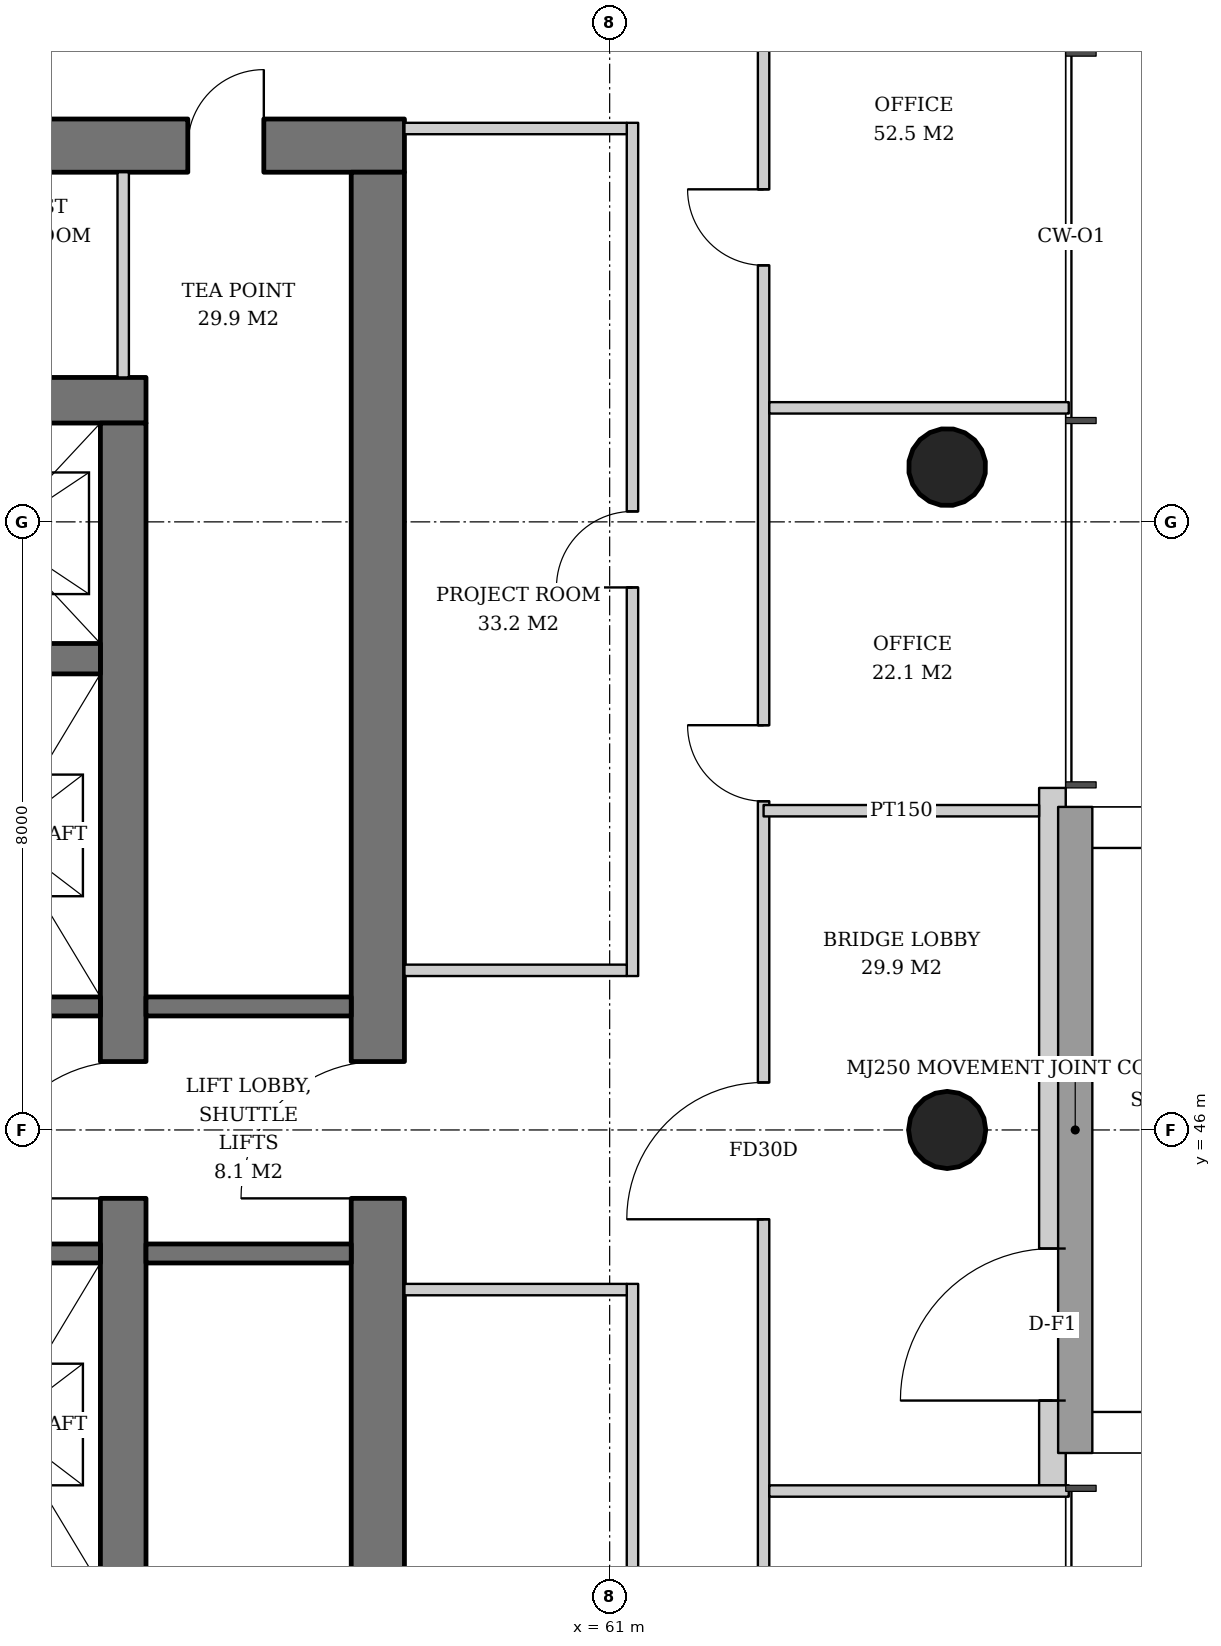
"""IFC4 building model, lengths in metres.
Left out: names, types, materials, properties, quantities, classifications, styles, units other than length and angle.
Written with IfcOpenShell. Run it as: python <this file> out.ifc"""

import sys

from ifc_helpers import new_model, si_unit, direction, frame, frame_2d, origin, origin_2d, place, context, subcontext, project, spatial, rectangle, hollow_circle, extrude, element, fill, save


model = new_model("IFC4")
c1 = context("Model", 3, precision=1e-05, world=origin(), true_north=direction((0.0, 1.0)))
c2 = subcontext(c1, "Body", "Model", "MODEL_VIEW")
j1 = project(units=[si_unit("LENGTHUNIT", "METRE"), si_unit("PLANEANGLEUNIT", "RADIAN")], contexts=[c1])
p1 = place(None, origin())
s1 = spatial("IfcSite", under=j1, at=p1, CompositionType="ELEMENT")
p2 = place(p1, origin())
s2 = spatial("IfcBuilding", under=s1, at=p2, CompositionType="ELEMENT")
p3 = place(p2, frame((0.0, 0.0, 131.2)))
s3 = spatial("IfcBuildingStorey", under=s2, at=p3, CompositionType="ELEMENT", Elevation=131.2)
p4 = place(p3, frame((65.479, 46.0, 0.0), z_axis=(-0.031914348339, 0.0, 0.999490607445), x_axis=(0.0, -1.0, 0.0)))
e1 = element("IfcColumn", 1, at=p4, inside=s3, PredefinedType="COLUMN", context=c2, shape_type="SweptSolid", body=[
    extrude(hollow_circle(Radius=0.508, WallThickness=0.04, at=origin_2d()), origin(), (0.0, 0.0, 1.0), 3.802),
])
p5 = place(p3, frame((65.479, 54.739, 0.0), z_axis=(-0.031910269556, -0.015987237665, 0.999362868496), x_axis=(0.447933021895, -0.894067115991, 0.0)))
e2 = element("IfcColumn", 2, at=p5, inside=s3, PredefinedType="COLUMN", context=c2, shape_type="SweptSolid", body=[
    extrude(hollow_circle(Radius=0.508, WallThickness=0.04, at=origin_2d()), origin(), (0.0, 0.0, 1.0), 3.802),
])
p6 = place(p3, frame((35.1, 55.6, 0.0), z_axis=(0.0, 0.0, 1.0), x_axis=(1.0, 0.0, 0.0)))
e3 = element("IfcWall", 3, at=p6, inside=s3, PredefinedType="SHEAR", context=c2, shape_type="SweptSolid", body=[
    extrude(rectangle(XDim=19.8, YDim=0.6, at=frame_2d((9.9, 0.0))), origin(), (0.0, 0.0, 1.0), 3.8),
])
p7 = place(p6, frame((14.54, 0.0, 0.0)))
e4 = element("IfcOpeningElement", 4, at=p7, cuts=e3, PredefinedType="OPENING", context=c2, shape_type="SweptSolid", body=[
    extrude(rectangle(XDim=1.0, YDim=2.1, at=frame_2d((0.5, 1.05))), frame((0.0, 0.31, 0.0), z_axis=(0.0, -1.0, 0.0), x_axis=(1.0, 0.0, 0.0)), (0.0, 0.0, 1.0), 0.62),
])
p8 = place(p6, frame((2.425, 0.0, 0.0)))
e5 = element("IfcOpeningElement", 5, at=p8, cuts=e3, PredefinedType="OPENING", context=c2, shape_type="SweptSolid", body=[
    extrude(rectangle(XDim=1.0, YDim=2.1, at=frame_2d((0.5, 1.05))), frame((0.0, 0.31, 0.0), z_axis=(0.0, -1.0, 0.0), x_axis=(1.0, 0.0, 0.0)), (0.0, 0.0, 1.0), 0.62),
])
p9 = place(p3, frame((54.6, 36.7, 0.0), z_axis=(0.0, 0.0, 1.0), x_axis=(0.0, 1.0, 0.0)))
e6 = element("IfcWall", 6, at=p9, inside=s3, PredefinedType="SHEAR", context=c2, shape_type="SweptSolid", body=[
    extrude(rectangle(XDim=18.6, YDim=0.6, at=frame_2d((9.3, 0.0))), origin(), (0.0, 0.0, 1.0), 3.8),
])
p10 = place(p9, frame((8.4, 0.0, 0.0)))
e7 = element("IfcOpeningElement", 7, at=p10, cuts=e6, PredefinedType="OPENING", context=c2, shape_type="SweptSolid", body=[
    extrude(rectangle(XDim=1.8, YDim=2.4, at=frame_2d((0.9, 1.2))), frame((0.0, 0.31, 0.0), z_axis=(0.0, -1.0, 0.0), x_axis=(1.0, 0.0, 0.0)), (0.0, 0.0, 1.0), 0.62),
])
p11 = place(p3, frame((31.7, 58.95, 0.0), z_axis=(0.0, 0.0, 1.0), x_axis=(1.0, 0.0, 0.0)))
e8 = element("IfcWall", 8, at=p11, inside=s3, PredefinedType="SHEAR", context=c2, shape_type="SweptSolid", body=[
    extrude(rectangle(XDim=26.6, YDim=0.7, at=frame_2d((13.3, 0.0))), origin(), (0.0, 0.0, 1.0), 3.8),
])
p12 = place(p11, frame((17.94, 0.0, 0.0)))
e9 = element("IfcOpeningElement", 9, at=p12, cuts=e8, PredefinedType="OPENING", context=c2, shape_type="SweptSolid", body=[
    extrude(rectangle(XDim=1.0, YDim=2.1, at=frame_2d((0.5, 1.05))), frame((0.0, 0.36, 0.0), z_axis=(0.0, -1.0, 0.0), x_axis=(1.0, 0.0, 0.0)), (0.0, 0.0, 1.0), 0.72),
])
p13 = place(p11, frame((5.825, 0.0, 0.0)))
e10 = element("IfcOpeningElement", 10, at=p13, cuts=e8, PredefinedType="OPENING", context=c2, shape_type="SweptSolid", body=[
    extrude(rectangle(XDim=1.0, YDim=2.1, at=frame_2d((0.5, 1.05))), frame((0.0, 0.36, 0.0), z_axis=(0.0, -1.0, 0.0), x_axis=(1.0, 0.0, 0.0)), (0.0, 0.0, 1.0), 0.72),
])
p14 = place(p11, frame((1.169, 0.0, 0.0)))
e11 = element("IfcOpeningElement", 11, at=p14, cuts=e8, PredefinedType="OPENING", context=c2, shape_type="SweptSolid", body=[
    extrude(rectangle(XDim=1.0, YDim=2.1, at=frame_2d((0.5, 1.05))), frame((0.0, 0.36, 0.0), z_axis=(0.0, -1.0, 0.0), x_axis=(1.0, 0.0, 0.0)), (0.0, 0.0, 1.0), 0.72),
])
p15 = place(p11, frame((3.447, 0.0, 0.0)))
e12 = element("IfcOpeningElement", 12, at=p15, cuts=e8, PredefinedType="OPENING", context=c2, shape_type="SweptSolid", body=[
    extrude(rectangle(XDim=1.0, YDim=2.1, at=frame_2d((0.5, 1.05))), frame((0.0, 0.36, 0.0), z_axis=(0.0, -1.0, 0.0), x_axis=(1.0, 0.0, 0.0)), (0.0, 0.0, 1.0), 0.72),
])
p16 = place(p11, frame((8.342, 0.0, 0.0)))
e13 = element("IfcOpeningElement", 13, at=p16, cuts=e8, PredefinedType="OPENING", context=c2, shape_type="SweptSolid", body=[
    extrude(rectangle(XDim=1.0, YDim=2.1, at=frame_2d((0.5, 1.05))), frame((0.0, 0.36, 0.0), z_axis=(0.0, -1.0, 0.0), x_axis=(1.0, 0.0, 0.0)), (0.0, 0.0, 1.0), 0.72),
])
p17 = place(p11, frame((11.626, 0.0, 0.0)))
e14 = element("IfcOpeningElement", 14, at=p17, cuts=e8, PredefinedType="OPENING", context=c2, shape_type="SweptSolid", body=[
    extrude(rectangle(XDim=1.0, YDim=2.1, at=frame_2d((0.5, 1.05))), frame((0.0, 0.36, 0.0), z_axis=(0.0, -1.0, 0.0), x_axis=(1.0, 0.0, 0.0)), (0.0, 0.0, 1.0), 0.72),
])
p18 = place(p11, frame((14.862, 0.0, 0.0)))
e15 = element("IfcOpeningElement", 15, at=p18, cuts=e8, PredefinedType="OPENING", context=c2, shape_type="SweptSolid", body=[
    extrude(rectangle(XDim=1.0, YDim=2.1, at=frame_2d((0.5, 1.05))), frame((0.0, 0.36, 0.0), z_axis=(0.0, -1.0, 0.0), x_axis=(1.0, 0.0, 0.0)), (0.0, 0.0, 1.0), 0.72),
])
p19 = place(p11, frame((20.9, 0.0, 0.0)))
e16 = element("IfcOpeningElement", 16, at=p19, cuts=e8, PredefinedType="OPENING", context=c2, shape_type="SweptSolid", body=[
    extrude(rectangle(XDim=1.0, YDim=2.1, at=frame_2d((0.5, 1.05))), frame((0.0, 0.36, 0.0), z_axis=(0.0, -1.0, 0.0), x_axis=(1.0, 0.0, 0.0)), (0.0, 0.0, 1.0), 0.72),
])
p20 = place(p11, frame((23.75, 0.0, 0.0)))
e17 = element("IfcOpeningElement", 17, at=p20, cuts=e8, PredefinedType="OPENING", context=c2, shape_type="SweptSolid", body=[
    extrude(rectangle(XDim=1.0, YDim=2.1, at=frame_2d((0.5, 1.05))), frame((0.0, 0.36, 0.0), z_axis=(0.0, -1.0, 0.0), x_axis=(1.0, 0.0, 0.0)), (0.0, 0.0, 1.0), 0.72),
])
p21 = place(p3, frame((57.95, 33.4, 0.0), z_axis=(0.0, 0.0, 1.0), x_axis=(0.0, 1.0, 0.0)))
e18 = element("IfcWall", 18, at=p21, inside=s3, PredefinedType="SHEAR", context=c2, shape_type="SweptSolid", body=[
    extrude(rectangle(XDim=25.2, YDim=0.7, at=frame_2d((12.6, 0.0))), origin(), (0.0, 0.0, 1.0), 3.8),
])
p22 = place(p21, frame((11.7, 0.0, 0.0)))
e19 = element("IfcOpeningElement", 19, at=p22, cuts=e18, PredefinedType="OPENING", context=c2, shape_type="SweptSolid", body=[
    extrude(rectangle(XDim=1.8, YDim=2.4, at=frame_2d((0.9, 1.2))), frame((0.0, 0.36, 0.0), z_axis=(0.0, -1.0, 0.0), x_axis=(1.0, 0.0, 0.0)), (0.0, 0.0, 1.0), 0.72),
])
p23 = place(p3, frame((35.7, 52.2, 0.0), z_axis=(0.0, 0.0, 1.0), x_axis=(1.0, 0.0, 0.0)))
e20 = element("IfcWall", 20, at=p23, inside=s3, PredefinedType="SHEAR", context=c2, shape_type="SweptSolid", body=[
    extrude(rectangle(XDim=18.6, YDim=0.4, at=frame_2d((9.3, 0.0))), origin(), (0.0, 0.0, 1.0), 3.8),
])
p24 = place(p3, frame((66.825, 41.325, 0.0), z_axis=(0.0, 0.0, 1.0), x_axis=(0.0, 1.0, 0.0)))
e21 = element("IfcWall", 21, at=p24, inside=s3, PredefinedType="SOLIDWALL", context=c2, shape_type="SweptSolid", body=[
    extrude(rectangle(XDim=9.175, YDim=0.35, at=frame_2d((4.587, 0.0))), origin(), (0.0, 0.0, 1.0), 3.62),
])
p25 = place(p24, frame((1.115, 0.0, 0.0)))
e22 = element("IfcOpeningElement", 22, at=p25, cuts=e21, PredefinedType="OPENING", context=c2, shape_type="SweptSolid", body=[
    extrude(rectangle(XDim=2.0, YDim=2.4, at=frame_2d((1.0, 1.2))), frame((0.0, 0.185, 0.0), z_axis=(0.0, -1.0, 0.0), x_axis=(1.0, 0.0, 0.0)), (0.0, 0.0, 1.0), 0.37),
])
for number, where, z_axis, x_axis in (
    (23, (48.93, 47.625, 0.0), (0.0, 0.0, 1.0), (1.0, 0.0, 0.0)),
    (24, (48.93, 44.375, 0.0), (0.0, 0.0, 1.0), (1.0, 0.0, 0.0)),
):
    element("IfcWall", number, at=place(p3, frame(where, z_axis=z_axis, x_axis=x_axis)), inside=s3, PredefinedType="SHEAR", context=c2, shape_type="SweptSolid", body=[
        extrude(rectangle(XDim=5.37, YDim=0.25, at=frame_2d((2.685, 0.0))), origin(), (0.0, 0.0, 1.0), 3.8),
    ])
for number, where, z_axis, x_axis in (
    (25, (54.9, 44.375, 0.0), (0.0, 0.0, 1.0), (1.0, 0.0, 0.0)),
    (26, (54.9, 47.625, 0.0), (0.0, 0.0, 1.0), (1.0, 0.0, 0.0)),
):
    element("IfcWall", number, at=place(p3, frame(where, z_axis=z_axis, x_axis=x_axis)), inside=s3, PredefinedType="SOLIDWALL", context=c2, shape_type="SweptSolid", body=[
        extrude(rectangle(XDim=2.7, YDim=0.25, at=frame_2d((1.35, 0.0))), origin(), (0.0, 0.0, 1.0), 3.62),
    ])
p26 = place(p3, frame((54.6, 55.9, 0.0), z_axis=(0.0, 0.0, 1.0), x_axis=(0.0, 1.0, 0.0)))
e27 = element("IfcWall", 27, at=p26, inside=s3, PredefinedType="SOLIDWALL", context=c2, shape_type="SweptSolid", body=[
    extrude(rectangle(XDim=2.7, YDim=0.15, at=frame_2d((1.35, 0.0))), origin(), (0.0, 0.0, 1.0), 3.62),
])
p27 = place(p3, frame((61.3, 32.75, 0.0), z_axis=(0.0, 0.0, 1.0), x_axis=(0.0, 1.0, 0.0)))
e28 = element("IfcWall", 28, at=p27, inside=s3, PredefinedType="PARTITIONING", context=c2, shape_type="SweptSolid", body=[
    extrude(rectangle(XDim=11.225, YDim=0.15, at=frame_2d((5.613, 0.0))), origin(), (0.0, 0.0, 1.0), 2.72),
])
p28 = place(p27, frame((5.113, 0.0, 0.0)))
e29 = element("IfcOpeningElement", 29, at=p28, cuts=e28, PredefinedType="OPENING", context=c2, shape_type="SweptSolid", body=[
    extrude(rectangle(XDim=1.0, YDim=2.1, at=frame_2d((0.5, 1.05))), frame((0.0, 0.085, 0.0), z_axis=(0.0, -1.0, 0.0), x_axis=(1.0, 0.0, 0.0)), (0.0, 0.0, 1.0), 0.17),
])
p29 = place(p3, frame((58.3, 43.9, 0.0), z_axis=(0.0, 0.0, 1.0), x_axis=(1.0, 0.0, 0.0)))
e30 = element("IfcWall", 30, at=p29, inside=s3, PredefinedType="PARTITIONING", context=c2, shape_type="SweptSolid", body=[
    extrude(rectangle(XDim=2.925, YDim=0.15, at=frame_2d((1.462, 0.0))), origin(), (0.0, 0.0, 1.0), 3.62),
])
p30 = place(p3, frame((61.3, 48.025, 0.0), z_axis=(0.0, 0.0, 1.0), x_axis=(0.0, 1.0, 0.0)))
e31 = element("IfcWall", 31, at=p30, inside=s3, PredefinedType="PARTITIONING", context=c2, shape_type="SweptSolid", body=[
    extrude(rectangle(XDim=11.225, YDim=0.15, at=frame_2d((5.613, 0.0))), origin(), (0.0, 0.0, 1.0), 2.806),
])
p31 = place(p30, frame((5.113, 0.0, 0.0)))
e32 = element("IfcOpeningElement", 32, at=p31, cuts=e31, PredefinedType="OPENING", context=c2, shape_type="SweptSolid", body=[
    extrude(rectangle(XDim=1.0, YDim=2.1, at=frame_2d((0.5, 1.05))), frame((0.0, 0.085, 0.0), z_axis=(0.0, -1.0, 0.0), x_axis=(1.0, 0.0, 0.0)), (0.0, 0.0, 1.0), 0.17),
])
for number, where, z_axis, x_axis in (
    (33, (58.3, 48.1, 0.0), (0.0, 0.0, 1.0), (1.0, 0.0, 0.0)),
    (34, (58.3, 59.175, 0.0), (0.0, 0.0, 1.0), (1.0, 0.0, 0.0)),
):
    element("IfcWall", number, at=place(p3, frame(where, z_axis=z_axis, x_axis=x_axis)), inside=s3, PredefinedType="PARTITIONING", context=c2, shape_type="SweptSolid", body=[
        extrude(rectangle(XDim=2.925, YDim=0.15, at=frame_2d((1.462, 0.0))), origin(), (0.0, 0.0, 1.0), 3.62),
    ])
p32 = place(p3, frame((63.025, 29.888, 0.0), z_axis=(0.0, 0.0, 1.0), x_axis=(0.0, 1.0, 0.0)))
e35 = element("IfcWall", 35, at=p32, inside=s3, PredefinedType="PARTITIONING", context=c2, shape_type="SweptSolid", body=[
    extrude(rectangle(XDim=32.223, YDim=0.15, at=frame_2d((16.112, 0.0))), origin(), (0.0, 0.0, 1.0), 2.72),
])
p33 = place(p32, frame((3.737, 0.0, 0.0)))
e36 = element("IfcOpeningElement", 36, at=p33, cuts=e35, PredefinedType="OPENING", context=c2, shape_type="SweptSolid", body=[
    extrude(rectangle(XDim=1.0, YDim=2.1, at=frame_2d((0.5, 1.05))), frame((0.0, 0.085, 0.0), z_axis=(0.0, -1.0, 0.0), x_axis=(1.0, 0.0, 0.0)), (0.0, 0.0, 1.0), 0.17),
])
p34 = place(p32, frame((8.487, 0.0, 0.0)))
e37 = element("IfcOpeningElement", 37, at=p34, cuts=e35, PredefinedType="OPENING", context=c2, shape_type="SweptSolid", body=[
    extrude(rectangle(XDim=1.0, YDim=2.1, at=frame_2d((0.5, 1.05))), frame((0.0, 0.085, 0.0), z_axis=(0.0, -1.0, 0.0), x_axis=(1.0, 0.0, 0.0)), (0.0, 0.0, 1.0), 0.17),
])
p35 = place(p32, frame((14.937, 0.0, 0.0)))
e38 = element("IfcOpeningElement", 38, at=p35, cuts=e35, PredefinedType="OPENING", context=c2, shape_type="SweptSolid", body=[
    extrude(rectangle(XDim=1.8, YDim=2.4, at=frame_2d((0.9, 1.2))), frame((0.0, 0.085, 0.0), z_axis=(0.0, -1.0, 0.0), x_axis=(1.0, 0.0, 0.0)), (0.0, 0.0, 1.0), 0.17),
])
p36 = place(p32, frame((20.437, 0.0, 0.0)))
e39 = element("IfcOpeningElement", 39, at=p36, cuts=e35, PredefinedType="OPENING", context=c2, shape_type="SweptSolid", body=[
    extrude(rectangle(XDim=1.0, YDim=2.1, at=frame_2d((0.5, 1.05))), frame((0.0, 0.085, 0.0), z_axis=(0.0, -1.0, 0.0), x_axis=(1.0, 0.0, 0.0)), (0.0, 0.0, 1.0), 0.17),
])
p37 = place(p32, frame((27.487, 0.0, 0.0)))
e40 = element("IfcOpeningElement", 40, at=p37, cuts=e35, PredefinedType="OPENING", context=c2, shape_type="SweptSolid", body=[
    extrude(rectangle(XDim=1.0, YDim=2.1, at=frame_2d((0.5, 1.05))), frame((0.0, 0.085, 0.0), z_axis=(0.0, -1.0, 0.0), x_axis=(1.0, 0.0, 0.0)), (0.0, 0.0, 1.0), 0.17),
])
for number, where, z_axis, x_axis in (
    (41, (63.1, 41.25, 0.0), (0.0, 0.0, 1.0), (1.0, 0.0, 0.0)),
    (42, (63.1, 55.5, 0.0), (0.0, 0.0, 1.0), (1.0, 0.0, 0.0)),
):
    element("IfcWall", number, at=place(p3, frame(where, z_axis=z_axis, x_axis=x_axis)), inside=s3, PredefinedType="PARTITIONING", context=c2, shape_type="SweptSolid", body=[
        extrude(rectangle(XDim=3.94, YDim=0.15, at=frame_2d((1.97, 0.0))), origin(), (0.0, 0.0, 1.0), 2.82),
    ])
p38 = place(p3, frame((63.025, 50.2, 0.0), z_axis=(0.0, 0.0, 1.0), x_axis=(1.0, 0.0, 0.0)))
e43 = element("IfcWall", 43, at=p38, inside=s3, PredefinedType="PARTITIONING", context=c2, shape_type="SweptSolid", body=[
    extrude(rectangle(XDim=3.625, YDim=0.15, at=frame_2d((1.812, 0.0))), origin(), (0.0, 0.0, 1.0), 2.82),
])
p39 = place(p25, origin())
e44 = element("IfcDoor", 44, at=p39, inside=s3, OperationType="DOUBLE_DOOR_SINGLE_SWING", PredefinedType="DOOR", context=c2, shape_type="SweptSolid", body=[
    extrude(rectangle(XDim=2.0, YDim=2.4, at=frame_2d((1.0, 1.2))), frame((0.0, 0.025, 0.0), z_axis=(0.0, -1.0, 0.0), x_axis=(1.0, 0.0, 0.0)), (0.0, 0.0, 1.0), 0.05),
])
fill(e22, e44)
p40 = place(p10, origin())
e45 = element("IfcDoor", 45, at=p40, inside=s3, OperationType="DOUBLE_DOOR_SINGLE_SWING", PredefinedType="DOOR", context=c2, shape_type="SweptSolid", body=[
    extrude(rectangle(XDim=1.8, YDim=2.4, at=frame_2d((0.9, 1.2))), frame((0.0, 0.025, 0.0), z_axis=(0.0, -1.0, 0.0), x_axis=(1.0, 0.0, 0.0)), (0.0, 0.0, 1.0), 0.05),
])
fill(e7, e45)
p41 = place(p22, origin())
e46 = element("IfcDoor", 46, at=p41, inside=s3, OperationType="DOUBLE_DOOR_SINGLE_SWING", PredefinedType="DOOR", context=c2, shape_type="SweptSolid", body=[
    extrude(rectangle(XDim=1.8, YDim=2.4, at=frame_2d((0.9, 1.2))), frame((0.0, 0.025, 0.0), z_axis=(0.0, -1.0, 0.0), x_axis=(1.0, 0.0, 0.0)), (0.0, 0.0, 1.0), 0.05),
])
fill(e19, e46)
p42 = place(p20, origin())
e47 = element("IfcDoor", 47, at=p42, inside=s3, OperationType="SINGLE_SWING_RIGHT", PredefinedType="DOOR", context=c2, shape_type="SweptSolid", body=[
    extrude(rectangle(XDim=1.0, YDim=2.1, at=frame_2d((0.5, 1.05))), frame((0.0, -0.29, 0.0), z_axis=(0.0, -1.0, 0.0), x_axis=(1.0, 0.0, 0.0)), (0.0, 0.0, 1.0), 0.05),
])
fill(e17, e47)
p43 = place(p31, origin())
e48 = element("IfcDoor", 48, at=p43, inside=s3, OperationType="SINGLE_SWING_LEFT", PredefinedType="DOOR", context=c2, shape_type="SweptSolid", body=[
    extrude(rectangle(XDim=1.0, YDim=2.1, at=frame_2d((0.5, 1.05))), frame((0.0, 0.025, 0.0), z_axis=(0.0, -1.0, 0.0), x_axis=(1.0, 0.0, 0.0)), (0.0, 0.0, 1.0), 0.05),
])
fill(e32, e48)
p44 = place(p35, origin())
e49 = element("IfcDoor", 49, at=p44, inside=s3, OperationType="DOUBLE_DOOR_SINGLE_SWING", PredefinedType="DOOR", context=c2, shape_type="SweptSolid", body=[
    extrude(rectangle(XDim=1.8, YDim=2.4, at=frame_2d((0.9, 1.2))), frame((0.0, 0.025, 0.0), z_axis=(0.0, -1.0, 0.0), x_axis=(1.0, 0.0, 0.0)), (0.0, 0.0, 1.0), 0.05),
])
fill(e38, e49)
p45 = place(p36, origin())
e50 = element("IfcDoor", 50, at=p45, inside=s3, OperationType="SINGLE_SWING_RIGHT", PredefinedType="DOOR", context=c2, shape_type="SweptSolid", body=[
    extrude(rectangle(XDim=1.0, YDim=2.1, at=frame_2d((0.5, 1.05))), frame((0.0, 0.025, 0.0), z_axis=(0.0, -1.0, 0.0), x_axis=(1.0, 0.0, 0.0)), (0.0, 0.0, 1.0), 0.05),
])
fill(e39, e50)
p46 = place(p37, origin())
e51 = element("IfcDoor", 51, at=p46, inside=s3, OperationType="SINGLE_SWING_RIGHT", PredefinedType="DOOR", context=c2, shape_type="SweptSolid", body=[
    extrude(rectangle(XDim=1.0, YDim=2.1, at=frame_2d((0.5, 1.05))), frame((0.0, 0.025, 0.0), z_axis=(0.0, -1.0, 0.0), x_axis=(1.0, 0.0, 0.0)), (0.0, 0.0, 1.0), 0.05),
])
fill(e40, e51)
save(model, sys.argv[1])
